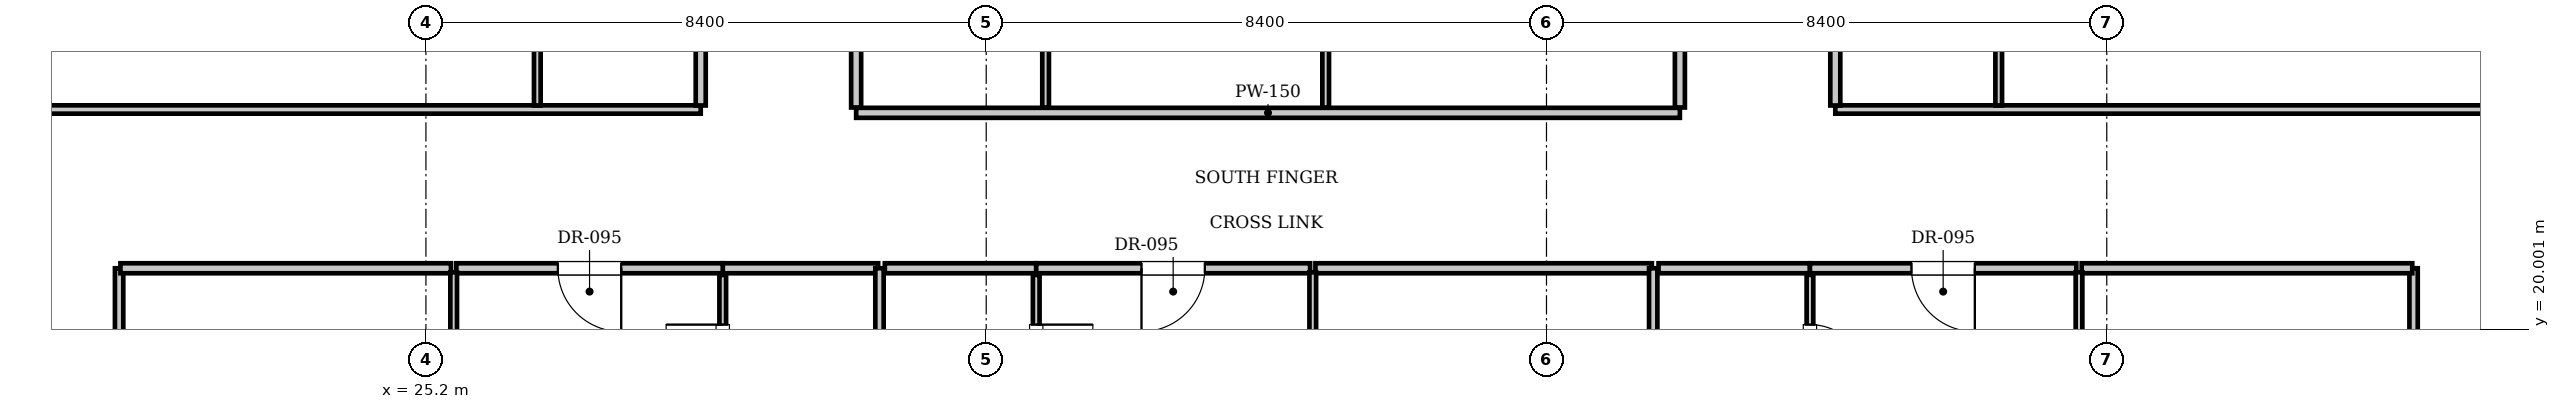
"""IFC4 building model, lengths in metres.
Left out: names, types, materials, properties, quantities, classifications, styles, units other than length and angle.
Written with IfcOpenShell. Run it as: python <this file> out.ifc"""

import sys

from ifc_helpers import new_model, si_unit, direction, frame, frame_2d, origin, place, context, subcontext, project, spatial, rectangle, extrude, element, fill, save


model = new_model("IFC4")
c1 = context("Model", 3, precision=1e-05, world=origin(), true_north=direction((0.0, 1.0)))
c2 = subcontext(c1, "Body", "Model", "MODEL_VIEW")
j1 = project(units=[si_unit("LENGTHUNIT", "METRE"), si_unit("PLANEANGLEUNIT", "RADIAN")], contexts=[c1])
p1 = place(None, origin())
s1 = spatial("IfcSite", under=j1, at=p1, CompositionType="ELEMENT")
p2 = place(p1, origin())
s2 = spatial("IfcBuilding", under=s1, at=p2, CompositionType="ELEMENT")
p3 = place(p2, frame((0.0, 0.0, 301.0)))
s3 = spatial("IfcBuildingStorey", under=s2, at=p3, CompositionType="ELEMENT", Elevation=301.0)
p4 = place(p3, frame((31.65, 23.25, 0.0), z_axis=(0.0, 0.0, 1.0), x_axis=(1.0, 0.0, 0.0)))
e1 = element("IfcWall", 1, at=p4, inside=s3, PredefinedType="PARTITIONING", context=c2, shape_type="SweptSolid", body=[
    extrude(rectangle(XDim=12.35, YDim=0.15, at=frame_2d((6.175, 0.0))), origin(), (0.0, 0.0, 1.0), 3.61),
])
for number, where, z_axis, x_axis in (
    (2, (31.65, 23.33, 0.0), (0.0, 0.0, 1.0), (0.0, 1.0, 0.0)),
    (3, (44.0, 23.33, 0.0), (0.0, 0.0, 1.0), (0.0, 1.0, 0.0)),
):
    element("IfcWall", number, at=place(p3, frame(where, z_axis=z_axis, x_axis=x_axis)), inside=s3, PredefinedType="PARTITIONING", context=c2, shape_type="SweptSolid", body=[
        extrude(rectangle(XDim=8.29, YDim=0.15, at=frame_2d((4.145, 0.0))), origin(), (0.0, 0.0, 1.0), 3.61),
    ])
for number, where, z_axis, x_axis in (
    (4, (34.49, 23.33, 0.0), (0.0, 0.0, 1.0), (0.0, 1.0, 0.0)),
    (5, (38.689, 23.33, 0.0), (0.0, 0.0, 1.0), (0.0, 1.0, 0.0)),
):
    element("IfcWall", number, at=place(p3, frame(where, z_axis=z_axis, x_axis=x_axis)), inside=s3, PredefinedType="PARTITIONING", context=c2, shape_type="SweptSolid", body=[
        extrude(rectangle(XDim=8.29, YDim=0.1, at=frame_2d((4.145, 0.0))), origin(), (0.0, 0.0, 1.0), 3.61),
    ])
for number, where, z_axis, x_axis in (
    (6, (20.6, 14.4, 0.0), (0.0, 0.0, 1.0), (0.0, 1.0, 0.0)),
    (7, (55.0, 14.4, 0.0), (0.0, 0.0, 1.0), (0.0, 1.0, 0.0)),
):
    element("IfcWall", number, at=place(p3, frame(where, z_axis=z_axis, x_axis=x_axis)), inside=s3, PredefinedType="PARTITIONING", context=c2, shape_type="SweptSolid", body=[
        extrude(rectangle(XDim=6.52, YDim=0.125, at=frame_2d((3.26, 0.0))), origin(), (0.0, 0.0, 1.0), 3.61),
    ])
p5 = place(p3, frame((29.65, 20.92, 0.0), z_axis=(0.0, 0.0, 1.0), x_axis=(1.0, 0.0, 0.0)))
e8 = element("IfcWall", 8, at=p5, inside=s3, PredefinedType="PARTITIONING", context=c2, shape_type="SweptSolid", body=[
    extrude(rectangle(XDim=2.33, YDim=0.15, at=frame_2d((1.165, 0.0))), origin(), (0.0, 0.0, 1.0), 3.61),
])
p6 = place(p3, frame((29.65, 18.48, 0.0), z_axis=(0.0, 0.0, 1.0), x_axis=(0.0, 1.0, 0.0)))
e9 = element("IfcWall", 9, at=p6, inside=s3, PredefinedType="PARTITIONING", context=c2, shape_type="SweptSolid", body=[
    extrude(rectangle(XDim=2.34, YDim=0.1, at=frame_2d((1.17, 0.0))), origin(), (0.0, 0.0, 1.0), 3.61),
])
p7 = place(p6, frame((0.745, 0.0, 0.0)))
e10 = element("IfcOpeningElement", 10, at=p7, cuts=e9, PredefinedType="OPENING", context=c2, shape_type="SweptSolid", body=[
    extrude(rectangle(XDim=0.85, YDim=2.1, at=frame_2d((0.425, 1.05))), frame((0.0, 0.06, 0.0), z_axis=(0.0, -1.0, 0.0), x_axis=(1.0, 0.0, 0.0)), (0.0, 0.0, 1.0), 0.12),
])
p8 = place(p3, frame((20.62, 20.92, 0.0), z_axis=(0.0, 0.0, 1.0), x_axis=(1.0, 0.0, 0.0)))
e11 = element("IfcWall", 11, at=p8, inside=s3, PredefinedType="PARTITIONING", context=c2, shape_type="SweptSolid", body=[
    extrude(rectangle(XDim=4.956, YDim=0.15, at=frame_2d((2.478, 0.0))), origin(), (0.0, 0.0, 1.0), 3.61),
])
p9 = place(p3, frame((25.656, 20.92, 0.0), z_axis=(0.0, 0.0, 1.0), x_axis=(1.0, 0.0, 0.0)))
e12 = element("IfcWall", 12, at=p9, inside=s3, PredefinedType="PARTITIONING", context=c2, shape_type="SweptSolid", body=[
    extrude(rectangle(XDim=3.994, YDim=0.15, at=frame_2d((1.997, 0.0))), origin(), (0.0, 0.0, 1.0), 3.61),
])
p10 = place(p9, frame((1.522, 0.0, 0.0)))
e13 = element("IfcOpeningElement", 13, at=p10, cuts=e12, PredefinedType="OPENING", context=c2, shape_type="SweptSolid", body=[
    extrude(rectangle(XDim=0.95, YDim=2.15, at=frame_2d((0.475, 1.075))), frame((0.0, 0.085, 0.0), z_axis=(0.0, -1.0, 0.0), x_axis=(1.0, 0.0, 0.0)), (0.0, 0.0, 1.0), 0.17),
])
p11 = place(p3, frame((25.616, 9.23, 0.0), z_axis=(0.0, 0.0, 1.0), x_axis=(0.0, 1.0, 0.0)))
e14 = element("IfcWall", 14, at=p11, inside=s3, PredefinedType="PARTITIONING", context=c2, shape_type="SweptSolid", body=[
    extrude(rectangle(XDim=11.63, YDim=0.1, at=frame_2d((5.815, 0.0))), origin(), (0.0, 0.0, 1.0), 3.61),
])
p12 = place(p11, frame((1.6, 0.0, 0.0)))
e15 = element("IfcOpeningElement", 15, at=p12, cuts=e14, PredefinedType="OPENING", context=c2, shape_type="SweptSolid", body=[
    extrude(rectangle(XDim=0.9, YDim=2.1, at=frame_2d((0.45, 1.05))), frame((0.0, 0.06, 0.0), z_axis=(0.0, -1.0, 0.0), x_axis=(1.0, 0.0, 0.0)), (0.0, 0.0, 1.0), 0.12),
])
p13 = place(p3, frame((32.0, 9.3, 0.0), z_axis=(0.0, 0.0, 1.0), x_axis=(0.0, 1.0, 0.0)))
e16 = element("IfcWall", 16, at=p13, inside=s3, PredefinedType="PARTITIONING", context=c2, shape_type="SweptSolid", body=[
    extrude(rectangle(XDim=11.62, YDim=0.125, at=frame_2d((5.81, 0.0))), origin(), (0.0, 0.0, 1.0), 3.61),
])
p14 = place(p3, frame((32.08, 20.92, 0.0), z_axis=(0.0, 0.0, 1.0), x_axis=(1.0, 0.0, 0.0)))
e17 = element("IfcWall", 17, at=p14, inside=s3, PredefinedType="PARTITIONING", context=c2, shape_type="SweptSolid", body=[
    extrude(rectangle(XDim=2.27, YDim=0.15, at=frame_2d((1.135, 0.0))), origin(), (0.0, 0.0, 1.0), 3.61),
])
p15 = place(p3, frame((34.35, 18.48, 0.0), z_axis=(0.0, 0.0, 1.0), x_axis=(0.0, 1.0, 0.0)))
e18 = element("IfcWall", 18, at=p15, inside=s3, PredefinedType="PARTITIONING", context=c2, shape_type="SweptSolid", body=[
    extrude(rectangle(XDim=2.34, YDim=0.1, at=frame_2d((1.17, 0.0))), origin(), (0.0, 0.0, 1.0), 3.61),
])
p16 = place(p15, frame((0.745, 0.0, 0.0)))
e19 = element("IfcOpeningElement", 19, at=p16, cuts=e18, PredefinedType="OPENING", context=c2, shape_type="SweptSolid", body=[
    extrude(rectangle(XDim=0.85, YDim=2.1, at=frame_2d((0.425, 1.05))), frame((0.0, 0.06, 0.0), z_axis=(0.0, -1.0, 0.0), x_axis=(1.0, 0.0, 0.0)), (0.0, 0.0, 1.0), 0.12),
])
p17 = place(p3, frame((34.35, 20.92, 0.0), z_axis=(0.0, 0.0, 1.0), x_axis=(1.0, 0.0, 0.0)))
e20 = element("IfcWall", 20, at=p17, inside=s3, PredefinedType="PARTITIONING", context=c2, shape_type="SweptSolid", body=[
    extrude(rectangle(XDim=4.106, YDim=0.15, at=frame_2d((2.053, 0.0))), origin(), (0.0, 0.0, 1.0), 3.61),
])
p18 = place(p17, frame((1.578, 0.0, 0.0)))
e21 = element("IfcOpeningElement", 21, at=p18, cuts=e20, PredefinedType="OPENING", context=c2, shape_type="SweptSolid", body=[
    extrude(rectangle(XDim=0.95, YDim=2.15, at=frame_2d((0.475, 1.075))), frame((0.0, 0.085, 0.0), z_axis=(0.0, -1.0, 0.0), x_axis=(1.0, 0.0, 0.0)), (0.0, 0.0, 1.0), 0.17),
])
p19 = place(p3, frame((38.536, 20.92, 0.0), z_axis=(0.0, 0.0, 1.0), x_axis=(1.0, 0.0, 0.0)))
e22 = element("IfcWall", 22, at=p19, inside=s3, PredefinedType="PARTITIONING", context=c2, shape_type="SweptSolid", body=[
    extrude(rectangle(XDim=5.044, YDim=0.15, at=frame_2d((2.522, 0.0))), origin(), (0.0, 0.0, 1.0), 3.61),
])
p20 = place(p3, frame((38.496, 9.23, 0.0), z_axis=(0.0, 0.0, 1.0), x_axis=(0.0, 1.0, 0.0)))
e23 = element("IfcWall", 23, at=p20, inside=s3, PredefinedType="PARTITIONING", context=c2, shape_type="SweptSolid", body=[
    extrude(rectangle(XDim=11.63, YDim=0.1, at=frame_2d((5.815, 0.0))), origin(), (0.0, 0.0, 1.0), 3.61),
])
p21 = place(p20, frame((1.6, 0.0, 0.0)))
e24 = element("IfcOpeningElement", 24, at=p21, cuts=e23, PredefinedType="OPENING", context=c2, shape_type="SweptSolid", body=[
    extrude(rectangle(XDim=0.9, YDim=2.1, at=frame_2d((0.45, 1.05))), frame((0.0, 0.06, 0.0), z_axis=(0.0, -1.0, 0.0), x_axis=(1.0, 0.0, 0.0)), (0.0, 0.0, 1.0), 0.12),
])
p22 = place(p3, frame((43.6, 9.3, 0.0), z_axis=(0.0, 0.0, 1.0), x_axis=(0.0, 1.0, 0.0)))
e25 = element("IfcWall", 25, at=p22, inside=s3, PredefinedType="PARTITIONING", context=c2, shape_type="SweptSolid", body=[
    extrude(rectangle(XDim=11.62, YDim=0.125, at=frame_2d((5.81, 0.0))), origin(), (0.0, 0.0, 1.0), 3.61),
])
p23 = place(p3, frame((43.68, 20.92, 0.0), z_axis=(0.0, 0.0, 1.0), x_axis=(1.0, 0.0, 0.0)))
e26 = element("IfcWall", 26, at=p23, inside=s3, PredefinedType="PARTITIONING", context=c2, shape_type="SweptSolid", body=[
    extrude(rectangle(XDim=2.27, YDim=0.15, at=frame_2d((1.135, 0.0))), origin(), (0.0, 0.0, 1.0), 3.61),
])
p24 = place(p3, frame((45.95, 18.48, 0.0), z_axis=(0.0, 0.0, 1.0), x_axis=(0.0, 1.0, 0.0)))
e27 = element("IfcWall", 27, at=p24, inside=s3, PredefinedType="PARTITIONING", context=c2, shape_type="SweptSolid", body=[
    extrude(rectangle(XDim=2.34, YDim=0.1, at=frame_2d((1.17, 0.0))), origin(), (0.0, 0.0, 1.0), 3.61),
])
p25 = place(p24, frame((0.745, 0.0, 0.0)))
e28 = element("IfcOpeningElement", 28, at=p25, cuts=e27, PredefinedType="OPENING", context=c2, shape_type="SweptSolid", body=[
    extrude(rectangle(XDim=0.85, YDim=2.1, at=frame_2d((0.425, 1.05))), frame((0.0, 0.06, 0.0), z_axis=(0.0, -1.0, 0.0), x_axis=(1.0, 0.0, 0.0)), (0.0, 0.0, 1.0), 0.12),
])
p26 = place(p3, frame((45.95, 20.92, 0.0), z_axis=(0.0, 0.0, 1.0), x_axis=(1.0, 0.0, 0.0)))
e29 = element("IfcWall", 29, at=p26, inside=s3, PredefinedType="PARTITIONING", context=c2, shape_type="SweptSolid", body=[
    extrude(rectangle(XDim=3.994, YDim=0.15, at=frame_2d((1.997, 0.0))), origin(), (0.0, 0.0, 1.0), 3.61),
])
p27 = place(p26, frame((1.522, 0.0, 0.0)))
e30 = element("IfcOpeningElement", 30, at=p27, cuts=e29, PredefinedType="OPENING", context=c2, shape_type="SweptSolid", body=[
    extrude(rectangle(XDim=0.95, YDim=2.15, at=frame_2d((0.475, 1.075))), frame((0.0, 0.085, 0.0), z_axis=(0.0, -1.0, 0.0), x_axis=(1.0, 0.0, 0.0)), (0.0, 0.0, 1.0), 0.17),
])
p28 = place(p3, frame((50.024, 20.92, 0.0), z_axis=(0.0, 0.0, 1.0), x_axis=(1.0, 0.0, 0.0)))
e31 = element("IfcWall", 31, at=p28, inside=s3, PredefinedType="PARTITIONING", context=c2, shape_type="SweptSolid", body=[
    extrude(rectangle(XDim=4.956, YDim=0.15, at=frame_2d((2.478, 0.0))), origin(), (0.0, 0.0, 1.0), 3.61),
])
p29 = place(p3, frame((49.984, 9.23, 0.0), z_axis=(0.0, 0.0, 1.0), x_axis=(0.0, 1.0, 0.0)))
e32 = element("IfcWall", 32, at=p29, inside=s3, PredefinedType="PARTITIONING", context=c2, shape_type="SweptSolid", body=[
    extrude(rectangle(XDim=11.63, YDim=0.1, at=frame_2d((5.815, 0.0))), origin(), (0.0, 0.0, 1.0), 3.61),
])
p30 = place(p29, frame((1.6, 0.0, 0.0)))
e33 = element("IfcOpeningElement", 33, at=p30, cuts=e32, PredefinedType="OPENING", context=c2, shape_type="SweptSolid", body=[
    extrude(rectangle(XDim=0.9, YDim=2.1, at=frame_2d((0.45, 1.05))), frame((0.0, 0.06, 0.0), z_axis=(0.0, -1.0, 0.0), x_axis=(1.0, 0.0, 0.0)), (0.0, 0.0, 1.0), 0.12),
])
p31 = place(p3, frame((15.5, 23.3, 0.0), z_axis=(0.0, 0.0, 1.0), x_axis=(1.0, 0.0, 0.0)))
e34 = element("IfcWall", 34, at=p31, inside=s3, PredefinedType="PARTITIONING", context=c2, shape_type="SweptSolid", body=[
    extrude(rectangle(XDim=13.82, YDim=0.125, at=frame_2d((6.91, 0.0))), origin(), (0.0, 0.0, 1.0), 3.61),
])
p32 = place(p3, frame((46.33, 23.3, 0.0), z_axis=(0.0, 0.0, 1.0), x_axis=(1.0, 0.0, 0.0)))
e35 = element("IfcWall", 35, at=p32, inside=s3, PredefinedType="PARTITIONING", context=c2, shape_type="SweptSolid", body=[
    extrude(rectangle(XDim=13.77, YDim=0.125, at=frame_2d((6.885, 0.0))), origin(), (0.0, 0.0, 1.0), 3.61),
])
p33 = place(p3, frame((29.32, 23.36, 0.0), z_axis=(0.0, 0.0, 1.0), x_axis=(0.0, 1.0, 0.0)))
e36 = element("IfcWall", 36, at=p33, inside=s3, PredefinedType="PARTITIONING", context=c2, shape_type="SweptSolid", body=[
    extrude(rectangle(XDim=1.89, YDim=0.15, at=frame_2d((0.945, 0.0))), origin(), (0.0, 0.0, 1.0), 3.61),
])
p34 = place(p3, frame((26.87, 23.36, 0.0), z_axis=(0.0, 0.0, 1.0), x_axis=(0.0, 1.0, 0.0)))
e37 = element("IfcWall", 37, at=p34, inside=s3, PredefinedType="PARTITIONING", context=c2, shape_type="SweptSolid", body=[
    extrude(rectangle(XDim=1.89, YDim=0.1, at=frame_2d((0.945, 0.0))), origin(), (0.0, 0.0, 1.0), 3.61),
])
p35 = place(p3, frame((46.33, 23.36, 0.0), z_axis=(0.0, 0.0, 1.0), x_axis=(0.0, 1.0, 0.0)))
e38 = element("IfcWall", 38, at=p35, inside=s3, PredefinedType="PARTITIONING", context=c2, shape_type="SweptSolid", body=[
    extrude(rectangle(XDim=1.89, YDim=0.15, at=frame_2d((0.945, 0.0))), origin(), (0.0, 0.0, 1.0), 3.61),
])
p36 = place(p3, frame((48.78, 23.36, 0.0), z_axis=(0.0, 0.0, 1.0), x_axis=(0.0, 1.0, 0.0)))
e39 = element("IfcWall", 39, at=p36, inside=s3, PredefinedType="PARTITIONING", context=c2, shape_type="SweptSolid", body=[
    extrude(rectangle(XDim=1.89, YDim=0.1, at=frame_2d((0.945, 0.0))), origin(), (0.0, 0.0, 1.0), 3.61),
])
p37 = place(p7, origin())
e40 = element("IfcDoor", 40, at=p37, inside=s3, OperationType="SINGLE_SWING_RIGHT", PredefinedType="DOOR", context=c2, shape_type="SweptSolid", body=[
    extrude(rectangle(XDim=0.85, YDim=2.1, at=frame_2d((0.425, 1.05))), frame((0.0, 0.025, 0.0), z_axis=(0.0, -1.0, 0.0), x_axis=(1.0, 0.0, 0.0)), (0.0, 0.0, 1.0), 0.05),
])
fill(e10, e40)
p38 = place(p10, frame((0.95, 0.0, 0.0), z_axis=(0.0, 0.0, 1.0), x_axis=(-1.0, 0.0, 0.0)))
e41 = element("IfcDoor", 41, at=p38, inside=s3, OperationType="SINGLE_SWING_LEFT", PredefinedType="DOOR", context=c2, shape_type="SweptSolid", body=[
    extrude(rectangle(XDim=0.95, YDim=2.15, at=frame_2d((0.475, 1.075))), frame((0.0, 0.025, 0.0), z_axis=(0.0, -1.0, 0.0), x_axis=(1.0, 0.0, 0.0)), (0.0, 0.0, 1.0), 0.05),
])
fill(e13, e41)
p39 = place(p16, frame((0.85, 0.0, 0.0), z_axis=(0.0, 0.0, 1.0), x_axis=(-1.0, 0.0, 0.0)))
e42 = element("IfcDoor", 42, at=p39, inside=s3, OperationType="SINGLE_SWING_LEFT", PredefinedType="DOOR", context=c2, shape_type="SweptSolid", body=[
    extrude(rectangle(XDim=0.85, YDim=2.1, at=frame_2d((0.425, 1.05))), frame((0.0, 0.025, 0.0), z_axis=(0.0, -1.0, 0.0), x_axis=(1.0, 0.0, 0.0)), (0.0, 0.0, 1.0), 0.05),
])
fill(e19, e42)
p40 = place(p18, frame((0.95, 0.0, 0.0), z_axis=(0.0, 0.0, 1.0), x_axis=(-1.0, 0.0, 0.0)))
e43 = element("IfcDoor", 43, at=p40, inside=s3, OperationType="SINGLE_SWING_RIGHT", PredefinedType="DOOR", context=c2, shape_type="SweptSolid", body=[
    extrude(rectangle(XDim=0.95, YDim=2.15, at=frame_2d((0.475, 1.075))), frame((0.0, 0.025, 0.0), z_axis=(0.0, -1.0, 0.0), x_axis=(1.0, 0.0, 0.0)), (0.0, 0.0, 1.0), 0.05),
])
fill(e21, e43)
p41 = place(p25, frame((0.85, 0.0, 0.0), z_axis=(0.0, 0.0, 1.0), x_axis=(-1.0, 0.0, 0.0)))
e44 = element("IfcDoor", 44, at=p41, inside=s3, OperationType="SINGLE_SWING_RIGHT", PredefinedType="DOOR", context=c2, shape_type="SweptSolid", body=[
    extrude(rectangle(XDim=0.85, YDim=2.1, at=frame_2d((0.425, 1.05))), frame((0.0, 0.025, 0.0), z_axis=(0.0, -1.0, 0.0), x_axis=(1.0, 0.0, 0.0)), (0.0, 0.0, 1.0), 0.05),
])
fill(e28, e44)
p42 = place(p27, frame((0.95, 0.0, 0.0), z_axis=(0.0, 0.0, 1.0), x_axis=(-1.0, 0.0, 0.0)))
e45 = element("IfcDoor", 45, at=p42, inside=s3, OperationType="SINGLE_SWING_LEFT", PredefinedType="DOOR", context=c2, shape_type="SweptSolid", body=[
    extrude(rectangle(XDim=0.95, YDim=2.15, at=frame_2d((0.475, 1.075))), frame((0.0, 0.025, 0.0), z_axis=(0.0, -1.0, 0.0), x_axis=(1.0, 0.0, 0.0)), (0.0, 0.0, 1.0), 0.05),
])
fill(e30, e45)
save(model, sys.argv[1])
